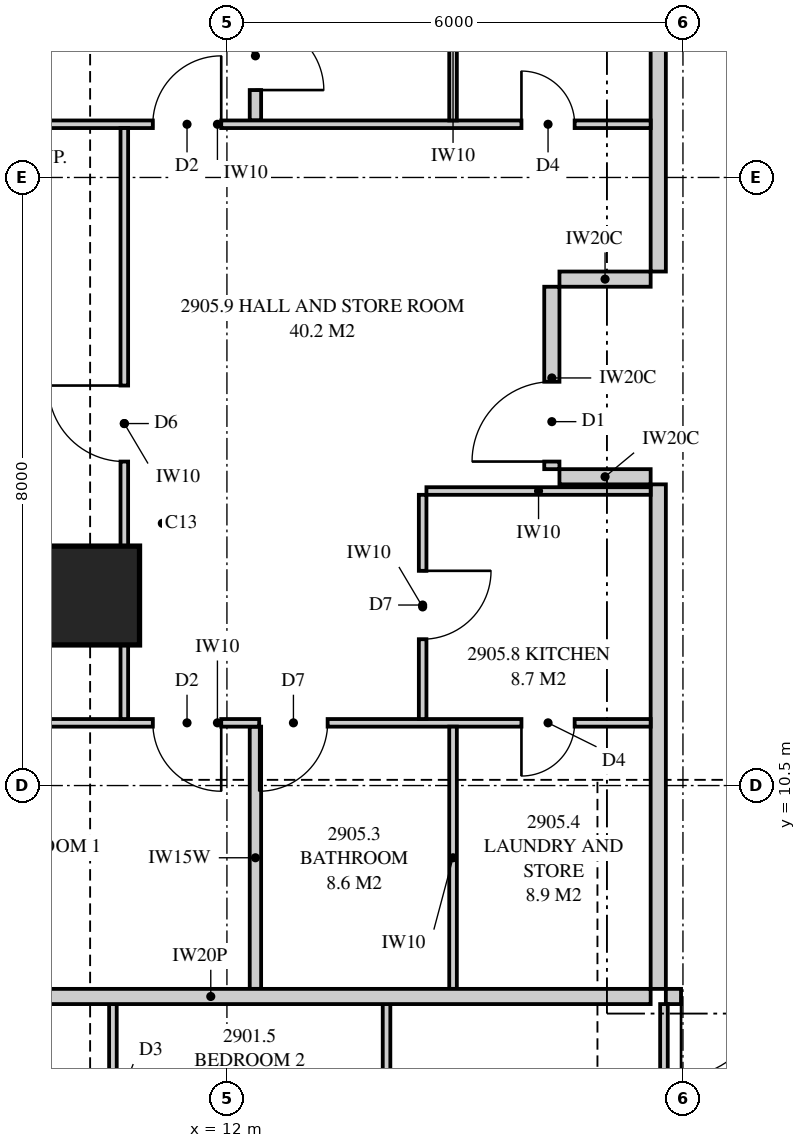
"""IFC4 building model, lengths in metres.
Left out: names, types, materials, properties, quantities, classifications, styles, units other than length and angle.
Written with IfcOpenShell. Run it as: python <this file> out.ifc"""

import sys

from ifc_helpers import new_model, si_unit, direction, frame, frame_2d, origin, origin_2d, place, context, subcontext, project, spatial, polyline, rectangle, outline, extrude, element, fill, save


model = new_model("IFC4")
c1 = context("Model", 3, precision=1e-05, world=origin(), true_north=direction((0.0, 1.0)))
c2 = subcontext(c1, "Body", "Model", "MODEL_VIEW")
j1 = project(units=[si_unit("LENGTHUNIT", "METRE"), si_unit("PLANEANGLEUNIT", "RADIAN")], contexts=[c1])
p1 = place(None, origin())
s1 = spatial("IfcSite", under=j1, at=p1, CompositionType="ELEMENT")
p2 = place(p1, origin())
s2 = spatial("IfcBuilding", under=s1, at=p2, CompositionType="ELEMENT")
p3 = place(p2, frame((0.0, 0.0, 108.2)))
s3 = spatial("IfcBuildingStorey", under=s2, at=p3, CompositionType="ELEMENT", Elevation=108.2)
p4 = place(p3, frame((10.2, 13.0, 0.0), z_axis=(0.0, 0.0, 1.0), x_axis=(1.0, 0.0, 0.0)))
e1 = element("IfcColumn", 1, at=p4, inside=s3, PredefinedType="COLUMN", context=c2, shape_type="SweptSolid", body=[
    extrude(rectangle(XDim=1.3, YDim=1.3, at=origin_2d()), origin(), (0.0, 0.0, 1.0), 3.35),
])
p5 = place(p3, frame((17.775, 7.725, 0.0), z_axis=(0.0, 0.0, 1.0), x_axis=(1.0, 0.0, 0.0)))
e2 = element("IfcWall", 2, at=p5, inside=s3, PredefinedType="PARTITIONING", context=c2, shape_type="SweptSolid", body=[
    extrude(rectangle(XDim=8.225, YDim=0.2, at=frame_2d((4.113, 0.0))), origin(), (0.0, 0.0, 1.0), 3.11),
])
p6 = place(p5, frame((0.2, 0.0, 0.0)))
e3 = element("IfcOpeningElement", 3, at=p6, cuts=e2, PredefinedType="OPENING", context=c2, shape_type="SweptSolid", body=[
    extrude(rectangle(XDim=1.05, YDim=2.2, at=frame_2d((0.525, 1.1))), frame((0.0, 0.11, 0.0), z_axis=(0.0, -1.0, 0.0), x_axis=(1.0, 0.0, 0.0)), (0.0, 0.0, 1.0), 0.22),
])
p7 = place(p3, frame((10.5, 2.76, 0.0), z_axis=(0.0, 0.0, 1.0), x_axis=(0.0, 1.0, 0.0)))
e4 = element("IfcWall", 4, at=p7, inside=s3, PredefinedType="PARTITIONING", context=c2, shape_type="SweptSolid", body=[
    extrude(outline(polyline([(0.0, 0.0), (4.865, 0.0), (4.865, 2.51), (0.368, 2.51), (0.368, 2.15), (0.0, 2.15), (0.0, 0.0)])), frame((0.0, 0.05, 0.0), z_axis=(0.0, -1.0, 0.0), x_axis=(1.0, 0.0, 0.0)), (0.0, 0.0, 1.0), 0.1),
])
p8 = place(p7, frame((0.766, 0.0, 0.0)))
e5 = element("IfcOpeningElement", 5, at=p8, cuts=e4, PredefinedType="OPENING", context=c2, shape_type="SweptSolid", body=[
    extrude(rectangle(XDim=0.9, YDim=2.1, at=frame_2d((0.45, 1.05))), frame((0.0, 0.06, 0.0), z_axis=(0.0, -1.0, 0.0), x_axis=(1.0, 0.0, 0.0)), (0.0, 0.0, 1.0), 0.12),
])
p9 = place(p7, frame((2.941, 0.0, 0.0)))
e6 = element("IfcOpeningElement", 6, at=p9, cuts=e4, PredefinedType="OPENING", context=c2, shape_type="SweptSolid", body=[
    extrude(rectangle(XDim=0.9, YDim=2.1, at=frame_2d((0.45, 1.05))), frame((0.0, 0.06, 0.0), z_axis=(0.0, -1.0, 0.0), x_axis=(1.0, 0.0, 0.0)), (0.0, 0.0, 1.0), 0.12),
])
p10 = place(p3, frame((14.1, 0.175, 0.0), z_axis=(0.0, 0.0, 1.0), x_axis=(0.0, 1.0, 0.0)))
e7 = element("IfcWall", 7, at=p10, inside=s3, PredefinedType="PARTITIONING", context=c2, shape_type="SweptSolid", body=[
    extrude(outline(polyline([(0.0, 0.0), (7.45, 0.0), (7.45, 3.11), (2.219, 3.11), (2.219, 2.15), (0.463, 2.15), (0.463, 3.11), (0.0, 3.11), (0.0, 0.0)])), frame((0.0, 0.05, 0.0), z_axis=(0.0, -1.0, 0.0), x_axis=(1.0, 0.0, 0.0)), (0.0, 0.0, 1.0), 0.1),
])
p11 = place(p10, frame((3.6, 0.0, 0.0)))
e8 = element("IfcOpeningElement", 8, at=p11, cuts=e7, PredefinedType="OPENING", context=c2, shape_type="SweptSolid", body=[
    extrude(rectangle(XDim=0.9, YDim=2.1, at=frame_2d((0.45, 1.05))), frame((0.0, 0.06, 0.0), z_axis=(0.0, -1.0, 0.0), x_axis=(1.0, 0.0, 0.0)), (0.0, 0.0, 1.0), 0.12),
])
p12 = place(p3, frame((17.75, 4.675, 0.0), z_axis=(0.0, 0.0, 1.0), x_axis=(0.0, 1.0, 0.0)))
e9 = element("IfcWall", 9, at=p12, inside=s3, PredefinedType="PARTITIONING", context=c2, shape_type="SweptSolid", body=[
    extrude(rectangle(XDim=2.95, YDim=0.1, at=frame_2d((1.475, 0.0))), origin(), (0.0, 0.0, 1.0), 3.11),
])
p13 = place(p3, frame((6.0, 7.725, 0.0), z_axis=(0.0, 0.0, 1.0), x_axis=(1.0, 0.0, 0.0)))
e10 = element("IfcWall", 10, at=p13, inside=s3, PredefinedType="PARTITIONING", context=c2, shape_type="SweptSolid", body=[
    extrude(outline(polyline([(0.0, 0.0), (11.575, 0.0), (11.575, 3.11), (11.212, 3.11), (11.212, 2.541), (10.538, 2.541), (10.538, 3.11), (5.51, 3.11), (5.51, 2.51), (2.969, 2.51), (2.969, 2.541), (2.727, 2.541), (2.727, 2.15), (0.884, 2.15), (0.884, 3.11), (0.0, 3.11), (0.0, 0.0)])), frame((0.0, 0.1, 0.0), z_axis=(0.0, -1.0, 0.0), x_axis=(1.0, 0.0, 0.0)), (0.0, 0.0, 1.0), 0.2),
])
p14 = place(p3, frame((17.675, 7.825, 0.0), z_axis=(0.0, 0.0, 1.0), x_axis=(0.0, 1.0, 0.0)))
e11 = element("IfcWall", 11, at=p14, inside=s3, PredefinedType="PARTITIONING", context=c2, shape_type="SweptSolid", body=[
    extrude(outline(polyline([(0.0, 0.0), (6.637, 0.0), (6.637, 3.11), (3.087, 3.11), (3.087, 2.541), (2.413, 2.541), (2.413, 3.11), (0.0, 3.11), (0.0, 0.0)])), frame((0.0, 0.1, 0.0), z_axis=(0.0, -1.0, 0.0), x_axis=(1.0, 0.0, 0.0)), (0.0, 0.0, 1.0), 0.2),
])
p15 = place(p3, frame((6.175, 11.325, 0.0), z_axis=(0.0, 0.0, 1.0), x_axis=(1.0, 0.0, 0.0)))
e12 = element("IfcWall", 12, at=p15, inside=s3, PredefinedType="PARTITIONING", context=c2, shape_type="SweptSolid", body=[
    extrude(outline(polyline([(0.175, 3.11), (0.0, 3.11), (0.0, 0.0), (0.529, 0.0), (0.529, 0.325), (1.021, 0.325), (1.021, 0.0), (11.4, 0.0), (11.4, 3.11), (5.285, 3.11), (5.285, 2.51), (2.765, 2.51), (2.765, 3.11), (2.744, 3.11), (2.744, 2.541), (2.169, 2.541), (2.169, 3.11), (1.918, 3.11), (1.918, 2.15), (1.021, 2.15), (1.021, 1.825), (0.529, 1.825), (0.529, 2.15), (0.175, 2.15), (0.175, 3.11)])), frame((0.0, 0.05, 0.0), z_axis=(0.0, -1.0, 0.0), x_axis=(1.0, 0.0, 0.0)), (0.0, 0.0, 1.0), 0.1),
])
p16 = place(p15, frame((4.85, 0.0, 0.0)))
e13 = element("IfcOpeningElement", 13, at=p16, cuts=e12, PredefinedType="OPENING", context=c2, shape_type="SweptSolid", body=[
    extrude(rectangle(XDim=0.9, YDim=2.1, at=frame_2d((0.45, 1.05))), frame((0.0, 0.06, 0.0), z_axis=(0.0, -1.0, 0.0), x_axis=(1.0, 0.0, 0.0)), (0.0, 0.0, 1.0), 0.12),
])
p17 = place(p15, frame((6.25, 0.0, 0.0)))
e14 = element("IfcOpeningElement", 14, at=p17, cuts=e12, PredefinedType="OPENING", context=c2, shape_type="SweptSolid", body=[
    extrude(rectangle(XDim=0.9, YDim=2.1, at=frame_2d((0.45, 1.05))), frame((0.0, 0.06, 0.0), z_axis=(0.0, -1.0, 0.0), x_axis=(1.0, 0.0, 0.0)), (0.0, 0.0, 1.0), 0.12),
])
p18 = place(p15, frame((9.7, 0.0, 0.0)))
e15 = element("IfcOpeningElement", 15, at=p18, cuts=e12, PredefinedType="OPENING", context=c2, shape_type="SweptSolid", body=[
    extrude(rectangle(XDim=0.7, YDim=2.1, at=frame_2d((0.35, 1.05))), frame((0.0, 0.06, 0.0), z_axis=(0.0, -1.0, 0.0), x_axis=(1.0, 0.0, 0.0)), (0.0, 0.0, 1.0), 0.12),
])
p19 = place(p3, frame((6.175, 19.2, 0.0), z_axis=(0.0, 0.0, 1.0), x_axis=(1.0, 0.0, 0.0)))
e16 = element("IfcWall", 16, at=p19, inside=s3, PredefinedType="PARTITIONING", context=c2, shape_type="SweptSolid", body=[
    extrude(outline(polyline([(0.0, 0.0), (11.4, 0.0), (11.4, 3.11), (5.285, 3.11), (5.285, 2.51), (2.765, 2.51), (2.765, 3.11), (1.635, 3.11), (1.635, 2.15), (0.0, 2.15), (0.0, 3.11), (0.0, 0.0)])), frame((0.0, 0.05, 0.0), z_axis=(0.0, -1.0, 0.0), x_axis=(1.0, 0.0, 0.0)), (0.0, 0.0, 1.0), 0.1),
])
p20 = place(p19, frame((4.85, 0.0, 0.0)))
e17 = element("IfcOpeningElement", 17, at=p20, cuts=e16, PredefinedType="OPENING", context=c2, shape_type="SweptSolid", body=[
    extrude(rectangle(XDim=0.9, YDim=2.1, at=frame_2d((0.45, 1.05))), frame((0.0, 0.06, 0.0), z_axis=(0.0, -1.0, 0.0), x_axis=(1.0, 0.0, 0.0)), (0.0, 0.0, 1.0), 0.12),
])
p21 = place(p19, frame((9.7, 0.0, 0.0)))
e18 = element("IfcOpeningElement", 18, at=p21, cuts=e16, PredefinedType="OPENING", context=c2, shape_type="SweptSolid", body=[
    extrude(rectangle(XDim=0.7, YDim=2.1, at=frame_2d((0.35, 1.05))), frame((0.0, 0.06, 0.0), z_axis=(0.0, -1.0, 0.0), x_axis=(1.0, 0.0, 0.0)), (0.0, 0.0, 1.0), 0.12),
])
p22 = place(p3, frame((12.375, 7.825, 0.0), z_axis=(0.0, 0.0, 1.0), x_axis=(0.0, 1.0, 0.0)))
e19 = element("IfcWall", 19, at=p22, inside=s3, PredefinedType="PLUMBINGWALL", context=c2, shape_type="SweptSolid", body=[
    extrude(outline(polyline([(0.0, 0.0), (3.45, 0.0), (3.45, 3.11), (3.062, 3.11), (3.062, 2.541), (2.438, 2.541), (2.438, 3.11), (0.0, 3.11), (0.0, 0.0)])), frame((0.0, 0.075, 0.0), z_axis=(0.0, -1.0, 0.0), x_axis=(1.0, 0.0, 0.0)), (0.0, 0.0, 1.0), 0.15),
])
p23 = place(p3, frame((14.975, 7.825, 0.0), z_axis=(0.0, 0.0, 1.0), x_axis=(0.0, 1.0, 0.0)))
e20 = element("IfcWall", 20, at=p23, inside=s3, PredefinedType="PARTITIONING", context=c2, shape_type="SweptSolid", body=[
    extrude(outline(polyline([(0.0, 0.0), (3.45, 0.0), (3.45, 3.11), (3.037, 3.11), (3.037, 2.541), (2.463, 2.541), (2.463, 3.11), (0.0, 3.11), (0.0, 0.0)])), frame((0.0, 0.05, 0.0), z_axis=(0.0, -1.0, 0.0), x_axis=(1.0, 0.0, 0.0)), (0.0, 0.0, 1.0), 0.1),
])
p24 = place(p3, frame((12.375, 19.25, 0.0), z_axis=(0.0, 0.0, 1.0), x_axis=(0.0, 1.0, 0.0)))
e21 = element("IfcWall", 21, at=p24, inside=s3, PredefinedType="PLUMBINGWALL", context=c2, shape_type="SweptSolid", body=[
    extrude(rectangle(XDim=3.45, YDim=0.15, at=frame_2d((1.725, 0.0))), origin(), (0.0, 0.0, 1.0), 3.11),
])
p25 = place(p24, frame((0.4, 0.0, 0.0)))
e22 = element("IfcOpeningElement", 22, at=p25, cuts=e21, PredefinedType="OPENING", context=c2, shape_type="SweptSolid", body=[
    extrude(rectangle(XDim=0.9, YDim=2.1, at=frame_2d((0.45, 1.05))), frame((0.0, 0.085, 0.0), z_axis=(0.0, -1.0, 0.0), x_axis=(1.0, 0.0, 0.0)), (0.0, 0.0, 1.0), 0.17),
])
p26 = place(p3, frame((14.975, 19.25, 0.0), z_axis=(0.0, 0.0, 1.0), x_axis=(0.0, 1.0, 0.0)))
e23 = element("IfcWall", 23, at=p26, inside=s3, PredefinedType="PARTITIONING", context=c2, shape_type="SweptSolid", body=[
    extrude(rectangle(XDim=3.45, YDim=0.1, at=frame_2d((1.725, 0.0))), origin(), (0.0, 0.0, 1.0), 3.11),
])
p27 = place(p3, frame((14.575, 11.375, 0.0), z_axis=(0.0, 0.0, 1.0), x_axis=(0.0, 1.0, 0.0)))
e24 = element("IfcWall", 24, at=p27, inside=s3, PredefinedType="PARTITIONING", context=c2, shape_type="SweptSolid", body=[
    extrude(rectangle(XDim=2.95, YDim=0.1, at=frame_2d((1.475, 0.0))), origin(), (0.0, 0.0, 1.0), 3.11),
])
p28 = place(p27, frame((1.05, 0.0, 0.0)))
e25 = element("IfcOpeningElement", 25, at=p28, cuts=e24, PredefinedType="OPENING", context=c2, shape_type="SweptSolid", body=[
    extrude(rectangle(XDim=0.9, YDim=2.1, at=frame_2d((0.45, 1.05))), frame((0.0, 0.06, 0.0), z_axis=(0.0, -1.0, 0.0), x_axis=(1.0, 0.0, 0.0)), (0.0, 0.0, 1.0), 0.12),
])
p29 = place(p3, frame((14.625, 14.375, 0.0), z_axis=(0.0, 0.0, 1.0), x_axis=(1.0, 0.0, 0.0)))
e26 = element("IfcWall", 26, at=p29, inside=s3, PredefinedType="PARTITIONING", context=c2, shape_type="SweptSolid", body=[
    extrude(rectangle(XDim=2.95, YDim=0.1, at=frame_2d((1.475, 0.0))), origin(), (0.0, 0.0, 1.0), 3.11),
])
p30 = place(p3, frame((10.65, 11.375, 0.0), z_axis=(0.0, 0.0, 1.0), x_axis=(0.0, 1.0, 0.0)))
e27 = element("IfcWall", 27, at=p30, inside=s3, PredefinedType="PARTITIONING", context=c2, shape_type="SweptSolid", body=[
    extrude(outline(polyline([(0.0, 0.0), (7.775, 0.0), (7.775, 3.11), (7.775, 2.51), (1.685, 2.51), (0.0, 2.51), (0.0, 3.11), (0.0, 0.0)])), frame((0.0, 0.05, 0.0), z_axis=(0.0, -1.0, 0.0), x_axis=(1.0, 0.0, 0.0)), (0.0, 0.0, 1.0), 0.1),
])
p31 = place(p30, frame((3.387, 0.0, 0.0)))
e28 = element("IfcOpeningElement", 28, at=p31, cuts=e27, PredefinedType="OPENING", context=c2, shape_type="SweptSolid", body=[
    extrude(rectangle(XDim=1.0, YDim=2.1, at=frame_2d((0.5, 1.05))), frame((0.0, 0.06, 0.0), z_axis=(0.0, -1.0, 0.0), x_axis=(1.0, 0.0, 0.0)), (0.0, 0.0, 1.0), 0.12),
])
p32 = place(p3, frame((17.675, 17.262, 0.0), z_axis=(0.0, 0.0, 1.0), x_axis=(0.0, 1.0, 0.0)))
e29 = element("IfcWall", 29, at=p32, inside=s3, PredefinedType="PARTITIONING", context=c2, shape_type="SweptSolid", body=[
    extrude(rectangle(XDim=5.438, YDim=0.2, at=frame_2d((2.719, 0.0))), origin(), (0.0, 0.0, 1.0), 3.11),
])
p33 = place(p3, frame((16.275, 14.663, 0.0), z_axis=(0.0, 0.0, 1.0), x_axis=(0.0, 1.0, 0.0)))
e30 = element("IfcWall", 30, at=p33, inside=s3, PredefinedType="PARTITIONING", context=c2, shape_type="SweptSolid", body=[
    extrude(rectangle(XDim=2.4, YDim=0.2, at=frame_2d((1.2, 0.0))), origin(), (0.0, 0.0, 1.0), 3.11),
])
p34 = place(p33, frame((0.1, 0.0, 0.0)))
e31 = element("IfcOpeningElement", 31, at=p34, cuts=e30, PredefinedType="OPENING", context=c2, shape_type="SweptSolid", body=[
    extrude(rectangle(XDim=1.05, YDim=2.2, at=frame_2d((0.525, 1.1))), frame((0.0, 0.11, 0.0), z_axis=(0.0, -1.0, 0.0), x_axis=(1.0, 0.0, 0.0)), (0.0, 0.0, 1.0), 0.22),
])
for number, where, z_axis, x_axis in (
    (32, (17.575, 14.562, 0.0), (0.0, 0.0, 1.0), (-1.0, 0.0, 0.0)),
    (33, (17.575, 17.163, 0.0), (0.0, 0.0, 1.0), (-1.0, 0.0, 0.0)),
):
    element("IfcWall", number, at=place(p3, frame(where, z_axis=z_axis, x_axis=x_axis)), inside=s3, PredefinedType="PARTITIONING", context=c2, shape_type="SweptSolid", body=[
        extrude(rectangle(XDim=1.2, YDim=0.2, at=frame_2d((0.6, 0.0))), origin(), (0.0, 0.0, 1.0), 3.11),
    ])
p35 = place(p6, frame((1.05, 0.0, 0.0), z_axis=(0.0, 0.0, 1.0), x_axis=(-1.0, 0.0, 0.0)))
e34 = element("IfcDoor", 34, at=p35, inside=s3, OperationType="SINGLE_SWING_RIGHT", PredefinedType="DOOR", context=c2, shape_type="SweptSolid", body=[
    extrude(rectangle(XDim=1.05, YDim=2.2, at=frame_2d((0.525, 1.1))), frame((0.0, 0.025, 0.0), z_axis=(0.0, -1.0, 0.0), x_axis=(1.0, 0.0, 0.0)), (0.0, 0.0, 1.0), 0.05),
])
fill(e3, e34)
p36 = place(p34, origin())
e35 = element("IfcDoor", 35, at=p36, inside=s3, OperationType="SINGLE_SWING_LEFT", PredefinedType="DOOR", context=c2, shape_type="SweptSolid", body=[
    extrude(rectangle(XDim=1.05, YDim=2.2, at=frame_2d((0.525, 1.1))), frame((0.0, 0.025, 0.0), z_axis=(0.0, -1.0, 0.0), x_axis=(1.0, 0.0, 0.0)), (0.0, 0.0, 1.0), 0.05),
])
fill(e31, e35)
p37 = place(p16, frame((0.9, 0.0, 0.0), z_axis=(0.0, 0.0, 1.0), x_axis=(-1.0, 0.0, 0.0)))
e36 = element("IfcDoor", 36, at=p37, inside=s3, OperationType="SINGLE_SWING_LEFT", PredefinedType="DOOR", context=c2, shape_type="SweptSolid", body=[
    extrude(rectangle(XDim=0.9, YDim=2.1, at=frame_2d((0.45, 1.05))), frame((0.0, 0.025, 0.0), z_axis=(0.0, -1.0, 0.0), x_axis=(1.0, 0.0, 0.0)), (0.0, 0.0, 1.0), 0.05),
])
fill(e13, e36)
p38 = place(p17, frame((0.9, 0.0, 0.0), z_axis=(0.0, 0.0, 1.0), x_axis=(-1.0, 0.0, 0.0)))
e37 = element("IfcDoor", 37, at=p38, inside=s3, OperationType="SINGLE_SWING_RIGHT", PredefinedType="DOOR", context=c2, shape_type="SweptSolid", body=[
    extrude(rectangle(XDim=0.9, YDim=2.1, at=frame_2d((0.45, 1.05))), frame((0.0, 0.025, 0.0), z_axis=(0.0, -1.0, 0.0), x_axis=(1.0, 0.0, 0.0)), (0.0, 0.0, 1.0), 0.05),
])
fill(e14, e37)
p39 = place(p18, frame((0.7, 0.0, 0.0), z_axis=(0.0, 0.0, 1.0), x_axis=(-1.0, 0.0, 0.0)))
e38 = element("IfcDoor", 38, at=p39, inside=s3, OperationType="SINGLE_SWING_RIGHT", PredefinedType="DOOR", context=c2, shape_type="SweptSolid", body=[
    extrude(rectangle(XDim=0.7, YDim=2.1, at=frame_2d((0.35, 1.05))), frame((0.0, 0.025, 0.0), z_axis=(0.0, -1.0, 0.0), x_axis=(1.0, 0.0, 0.0)), (0.0, 0.0, 1.0), 0.05),
])
fill(e15, e38)
p40 = place(p20, origin())
e39 = element("IfcDoor", 39, at=p40, inside=s3, OperationType="SINGLE_SWING_RIGHT", PredefinedType="DOOR", context=c2, shape_type="SweptSolid", body=[
    extrude(rectangle(XDim=0.9, YDim=2.1, at=frame_2d((0.45, 1.05))), frame((0.0, 0.025, 0.0), z_axis=(0.0, -1.0, 0.0), x_axis=(1.0, 0.0, 0.0)), (0.0, 0.0, 1.0), 0.05),
])
fill(e17, e39)
p41 = place(p25, frame((0.9, 0.0, 0.0), z_axis=(0.0, 0.0, 1.0), x_axis=(-1.0, 0.0, 0.0)))
e40 = element("IfcDoor", 40, at=p41, inside=s3, OperationType="SINGLE_SWING_RIGHT", PredefinedType="DOOR", context=c2, shape_type="SweptSolid", body=[
    extrude(rectangle(XDim=0.9, YDim=2.1, at=frame_2d((0.45, 1.05))), frame((0.0, 0.025, 0.0), z_axis=(0.0, -1.0, 0.0), x_axis=(1.0, 0.0, 0.0)), (0.0, 0.0, 1.0), 0.05),
])
fill(e22, e40)
p42 = place(p21, origin())
e41 = element("IfcDoor", 41, at=p42, inside=s3, OperationType="SINGLE_SWING_LEFT", PredefinedType="DOOR", context=c2, shape_type="SweptSolid", body=[
    extrude(rectangle(XDim=0.7, YDim=2.1, at=frame_2d((0.35, 1.05))), frame((0.0, 0.025, 0.0), z_axis=(0.0, -1.0, 0.0), x_axis=(1.0, 0.0, 0.0)), (0.0, 0.0, 1.0), 0.05),
])
fill(e18, e41)
p43 = place(p28, frame((0.9, 0.0, 0.0), z_axis=(0.0, 0.0, 1.0), x_axis=(-1.0, 0.0, 0.0)))
e42 = element("IfcDoor", 42, at=p43, inside=s3, OperationType="SINGLE_SWING_LEFT", PredefinedType="DOOR", context=c2, shape_type="SweptSolid", body=[
    extrude(rectangle(XDim=0.9, YDim=2.1, at=frame_2d((0.45, 1.05))), frame((0.0, 0.025, 0.0), z_axis=(0.0, -1.0, 0.0), x_axis=(1.0, 0.0, 0.0)), (0.0, 0.0, 1.0), 0.05),
])
fill(e25, e42)
p44 = place(p31, origin())
e43 = element("IfcDoor", 43, at=p44, inside=s3, OperationType="SINGLE_SWING_RIGHT", PredefinedType="DOOR", context=c2, shape_type="SweptSolid", body=[
    extrude(rectangle(XDim=1.0, YDim=2.1, at=frame_2d((0.5, 1.05))), frame((0.0, 0.025, 0.0), z_axis=(0.0, -1.0, 0.0), x_axis=(1.0, 0.0, 0.0)), (0.0, 0.0, 1.0), 0.05),
])
fill(e28, e43)
save(model, sys.argv[1])
